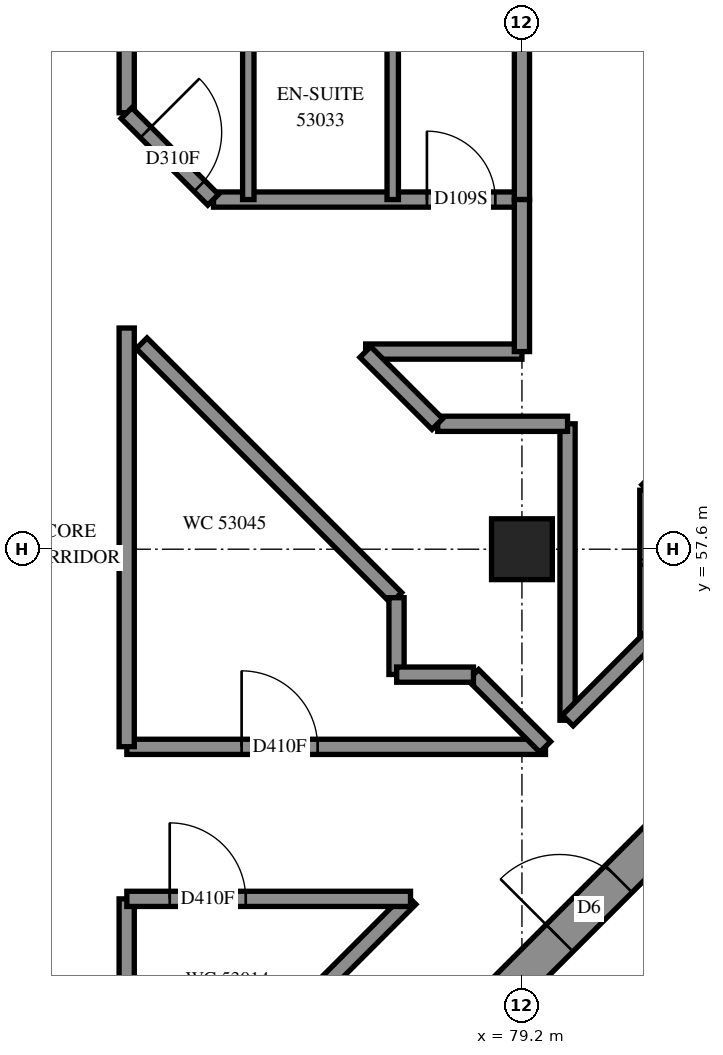
"""IFC4 building model, lengths in metres.
Left out: names, types, materials, properties, quantities, classifications, styles, units other than length and angle.
Written with IfcOpenShell. Run it as: python <this file> out.ifc"""

import sys

from ifc_helpers import new_model, si_unit, direction, frame, frame_2d, origin, origin_2d, place, context, subcontext, project, spatial, rectangle, extrude, element, fill, save


model = new_model("IFC4")
c1 = context("Model", 3, precision=1e-05, world=origin(), true_north=direction((0.0, 1.0)))
c2 = subcontext(c1, "Body", "Model", "MODEL_VIEW")
j1 = project(units=[si_unit("LENGTHUNIT", "METRE"), si_unit("PLANEANGLEUNIT", "RADIAN")], contexts=[c1])
p1 = place(None, origin())
s1 = spatial("IfcSite", under=j1, at=p1, CompositionType="ELEMENT")
p2 = place(p1, origin())
s2 = spatial("IfcBuilding", under=s1, at=p2, CompositionType="ELEMENT")
p3 = place(p2, frame((0.0, 0.0, 196.4)))
s3 = spatial("IfcBuildingStorey", under=s2, at=p3, CompositionType="ELEMENT", Elevation=196.4)
p4 = place(p3, frame((79.2, 57.6, 0.0), z_axis=(0.0, 0.0, 1.0), x_axis=(1.0, 0.0, 0.0)))
e1 = element("IfcColumn", 1, at=p4, inside=s3, PredefinedType="COLUMN", context=c2, shape_type="SweptSolid", body=[
    extrude(rectangle(XDim=0.8, YDim=0.8, at=origin_2d()), origin(), (0.0, 0.0, 1.0), 3.1),
])
p5 = place(p3, frame((76.478, 49.267, -0.3), z_axis=(0.0, 0.0, 1.0), x_axis=(0.7071067812, 0.7071067812, 0.0)))
e2 = element("IfcWall", 2, at=p5, inside=s3, PredefinedType="SHEAR", context=c2, shape_type="SweptSolid", body=[
    extrude(rectangle(XDim=14.4, YDim=0.5, at=frame_2d((7.2, 0.0))), origin(), (0.0, 0.0, 1.0), 2.7),
])
p6 = place(p5, frame((4.55, 0.0, 0.3)))
e3 = element("IfcOpeningElement", 3, at=p6, cuts=e2, PredefinedType="OPENING", context=c2, shape_type="SweptSolid", body=[
    extrude(rectangle(XDim=1.1, YDim=2.1, at=frame_2d((0.55, 1.05))), frame((0.0, 0.26, 0.0), z_axis=(0.0, -1.0, 0.0), x_axis=(1.0, 0.0, 0.0)), (0.0, 0.0, 1.0), 0.52),
])
p7 = place(p5, frame((11.35, 0.0, 0.3)))
e4 = element("IfcOpeningElement", 4, at=p7, cuts=e2, PredefinedType="OPENING", context=c2, shape_type="SweptSolid", body=[
    extrude(rectangle(XDim=1.1, YDim=2.1, at=frame_2d((0.55, 1.05))), frame((0.0, 0.26, 0.0), z_axis=(0.0, -1.0, 0.0), x_axis=(1.0, 0.0, 0.0)), (0.0, 0.0, 1.0), 0.52),
])
p8 = place(p3, frame((80.849, 58.377, 0.0), z_axis=(0.0, 0.0, 1.0), x_axis=(0.7071121294, 0.7071014329, 0.0)))
e5 = element("IfcWall", 5, at=p8, inside=s3, PredefinedType="PARTITIONING", context=c2, shape_type="SweptSolid", body=[
    extrude(rectangle(XDim=9.349, YDim=0.2, at=frame_2d((4.675, 0.0))), origin(), (0.0, 0.0, 1.0), 3.1),
])
p9 = place(p3, frame((74.002, 55.0, 0.0), z_axis=(0.0, 0.0, 1.0), x_axis=(1.0, 0.0, 0.0)))
e6 = element("IfcWall", 6, at=p9, inside=s3, PredefinedType="PARTITIONING", context=c2, shape_type="SweptSolid", body=[
    extrude(rectangle(XDim=5.508, YDim=0.2, at=frame_2d((2.754, 0.0))), origin(), (0.0, 0.0, 1.0), 3.1),
])
p10 = place(p9, frame((1.51, 0.0, 0.0)))
e7 = element("IfcOpeningElement", 7, at=p10, cuts=e6, PredefinedType="OPENING", context=c2, shape_type="SweptSolid", body=[
    extrude(rectangle(XDim=1.0, YDim=2.1, at=frame_2d((0.5, 1.05))), frame((0.0, 0.11, 0.0), z_axis=(0.0, -1.0, 0.0), x_axis=(1.0, 0.0, 0.0)), (0.0, 0.0, 1.0), 0.22),
])
p11 = place(p3, frame((74.0, 55.002, 0.0), z_axis=(0.0, 0.0, 1.0), x_axis=(0.0, 1.0, 0.0)))
e8 = element("IfcWall", 8, at=p11, inside=s3, PredefinedType="PARTITIONING", context=c2, shape_type="SweptSolid", body=[
    extrude(rectangle(XDim=5.508, YDim=0.2, at=frame_2d((2.754, 0.0))), origin(), (0.0, 0.0, 1.0), 3.1),
])
p12 = place(p3, frame((74.001, 49.267, 0.0), z_axis=(0.0, 0.0, 1.0), x_axis=(0.7071067812, 0.7071067812, 0.0)))
e9 = element("IfcWall", 9, at=p12, inside=s3, PredefinedType="PARTITIONING", context=c2, shape_type="SweptSolid", body=[
    extrude(rectangle(XDim=5.278, YDim=0.2, at=frame_2d((2.639, 0.0))), origin(), (0.0, 0.0, 1.0), 3.1),
])
p13 = place(p3, frame((74.197, 60.309, 0.0), z_axis=(0.0, 0.0, 1.0), x_axis=(0.7071067812, -0.7071067812, 0.0)))
e10 = element("IfcWall", 10, at=p13, inside=s3, PredefinedType="PARTITIONING", context=c2, shape_type="SweptSolid", body=[
    extrude(rectangle(XDim=4.738, YDim=0.2, at=frame_2d((2.369, 0.0))), origin(), (0.0, 0.0, 1.0), 3.1),
])
p14 = place(p3, frame((75.142, 62.2, 0.0), z_axis=(0.0, 0.0, 1.0), x_axis=(1.0, 0.0, 0.0)))
e11 = element("IfcWall", 11, at=p14, inside=s3, PredefinedType="PARTITIONING", context=c2, shape_type="SweptSolid", body=[
    extrude(rectangle(XDim=4.058, YDim=0.2, at=frame_2d((2.029, 0.0))), origin(), (0.0, 0.0, 1.0), 3.1),
])
p15 = place(p14, frame((2.808, 0.0, 0.0)))
e12 = element("IfcOpeningElement", 12, at=p15, cuts=e11, PredefinedType="OPENING", context=c2, shape_type="SweptSolid", body=[
    extrude(rectangle(XDim=0.9, YDim=2.1, at=frame_2d((0.45, 1.05))), frame((0.0, 0.11, 0.0), z_axis=(0.0, -1.0, 0.0), x_axis=(1.0, 0.0, 0.0)), (0.0, 0.0, 1.0), 0.22),
])
p16 = place(p3, frame((79.8, 55.35, 0.0), z_axis=(0.0, 0.0, 1.0), x_axis=(0.0, 1.0, 0.0)))
e13 = element("IfcWall", 13, at=p16, inside=s3, PredefinedType="PARTITIONING", context=c2, shape_type="SweptSolid", body=[
    extrude(rectangle(XDim=3.9, YDim=0.2, at=frame_2d((1.95, 0.0))), origin(), (0.0, 0.0, 1.0), 3.1),
])
p17 = place(p3, frame((74.0, 49.266, 0.0), z_axis=(0.0, 0.0, 1.0), x_axis=(0.0, 1.0, 0.0)))
e14 = element("IfcWall", 14, at=p17, inside=s3, PredefinedType="PARTITIONING", context=c2, shape_type="SweptSolid", body=[
    extrude(rectangle(XDim=3.734, YDim=0.2, at=frame_2d((1.867, 0.0))), origin(), (0.0, 0.0, 1.0), 3.1),
])
p18 = place(p3, frame((74.002, 53.0, 0.0), z_axis=(0.0, 0.0, 1.0), x_axis=(1.0, 0.0, 0.0)))
e15 = element("IfcWall", 15, at=p18, inside=s3, PredefinedType="PARTITIONING", context=c2, shape_type="SweptSolid", body=[
    extrude(rectangle(XDim=3.732, YDim=0.2, at=frame_2d((1.866, 0.0))), origin(), (0.0, 0.0, 1.0), 3.1),
])
p19 = place(p18, frame((0.564, 0.0, 0.0)))
e16 = element("IfcOpeningElement", 16, at=p19, cuts=e15, PredefinedType="OPENING", context=c2, shape_type="SweptSolid", body=[
    extrude(rectangle(XDim=1.0, YDim=2.1, at=frame_2d((0.5, 1.05))), frame((0.0, 0.11, 0.0), z_axis=(0.0, -1.0, 0.0), x_axis=(1.0, 0.0, 0.0)), (0.0, 0.0, 1.0), 0.22),
])
p20 = place(p3, frame((74.0, 63.342, 0.0), z_axis=(0.0, 0.0, 1.0), x_axis=(0.0, 1.0, 0.0)))
e17 = element("IfcWall", 17, at=p20, inside=s3, PredefinedType="PARTITIONING", context=c2, shape_type="SweptSolid", body=[
    extrude(rectangle(XDim=3.458, YDim=0.2, at=frame_2d((1.729, 0.0))), origin(), (0.0, 0.0, 1.0), 3.1),
])
for number, where, z_axis, x_axis in (
    (18, (75.6, 62.2, 0.0), (0.0, 0.0, 1.0), (0.0, 1.0, 0.0)),
    (19, (77.5, 62.2, 0.0), (0.0, 0.0, 1.0), (0.0, 1.0, 0.0)),
):
    element("IfcWall", number, at=place(p3, frame(where, z_axis=z_axis, x_axis=x_axis)), inside=s3, PredefinedType="PARTITIONING", context=c2, shape_type="SweptSolid", body=[
        extrude(rectangle(XDim=2.4, YDim=0.15, at=frame_2d((1.2, 0.0))), origin(), (0.0, 0.0, 1.0), 3.1),
    ])
p21 = place(p3, frame((79.2, 62.2, 0.0), z_axis=(0.0, 0.0, 1.0), x_axis=(0.0, 1.0, 0.0)))
e20 = element("IfcWall", 20, at=p21, inside=s3, PredefinedType="PARTITIONING", context=c2, shape_type="SweptSolid", body=[
    extrude(rectangle(XDim=2.2, YDim=0.2, at=frame_2d((1.1, 0.0))), origin(), (0.0, 0.0, 1.0), 3.1),
])
p22 = place(p3, frame((77.144, 60.2, 0.0), z_axis=(0.0, 0.0, 1.0), x_axis=(1.0, 0.0, 0.0)))
e21 = element("IfcWall", 21, at=p22, inside=s3, PredefinedType="PARTITIONING", context=c2, shape_type="SweptSolid", body=[
    extrude(rectangle(XDim=2.056, YDim=0.2, at=frame_2d((1.028, 0.0))), origin(), (0.0, 0.0, 1.0), 3.1),
])
p23 = place(p3, frame((79.2, 60.2, 0.0), z_axis=(0.0, 0.0, 1.0), x_axis=(0.0, 1.0, 0.0)))
e22 = element("IfcWall", 22, at=p23, inside=s3, PredefinedType="PARTITIONING", context=c2, shape_type="SweptSolid", body=[
    extrude(rectangle(XDim=2.0, YDim=0.2, at=frame_2d((1.0, 0.0))), origin(), (0.0, 0.0, 1.0), 3.1),
])
p24 = place(p3, frame((80.85, 56.49, 0.0), z_axis=(0.0, 0.0, 1.0), x_axis=(0.0, 1.0, 0.0)))
e23 = element("IfcWall", 23, at=p24, inside=s3, PredefinedType="PARTITIONING", context=c2, shape_type="SweptSolid", body=[
    extrude(rectangle(XDim=1.886, YDim=0.2, at=frame_2d((0.943, 0.0))), origin(), (0.0, 0.0, 1.0), 3.1),
])
p25 = place(p3, frame((78.092, 59.25, 0.0), z_axis=(0.0, 0.0, 1.0), x_axis=(1.0, 0.0, 0.0)))
e24 = element("IfcWall", 24, at=p25, inside=s3, PredefinedType="PARTITIONING", context=c2, shape_type="SweptSolid", body=[
    extrude(rectangle(XDim=1.708, YDim=0.2, at=frame_2d((0.854, 0.0))), origin(), (0.0, 0.0, 1.0), 3.1),
])
p26 = place(p3, frame((73.997, 63.337, 0.0), z_axis=(0.0, 0.0, 1.0), x_axis=(0.7071067812, -0.7071067812, 0.0)))
e25 = element("IfcWall", 25, at=p26, inside=s3, PredefinedType="PARTITIONING", context=c2, shape_type="SweptSolid", body=[
    extrude(rectangle(XDim=1.612, YDim=0.2, at=frame_2d((0.806, 0.0))), origin(), (0.0, 0.0, 1.0), 3.1),
])
p27 = place(p26, frame((0.357, 0.0, 0.0)))
e26 = element("IfcOpeningElement", 26, at=p27, cuts=e25, PredefinedType="OPENING", context=c2, shape_type="SweptSolid", body=[
    extrude(rectangle(XDim=1.0, YDim=2.1, at=frame_2d((0.5, 1.05))), frame((0.0, 0.11, 0.0), z_axis=(0.0, -1.0, 0.0), x_axis=(1.0, 0.0, 0.0)), (0.0, 0.0, 1.0), 0.22),
])
p28 = place(p3, frame((79.803, 55.347, 0.0), z_axis=(0.0, 0.0, 1.0), x_axis=(0.706460727, 0.7077522457, 0.0)))
e27 = element("IfcWall", 27, at=p28, inside=s3, PredefinedType="PARTITIONING", context=c2, shape_type="SweptSolid", body=[
    extrude(rectangle(XDim=1.549, YDim=0.2, at=frame_2d((0.774, 0.0))), origin(), (0.0, 0.0, 1.0), 3.1),
])
for number, where, z_axis, x_axis in (
    (28, (78.559, 55.947, 0.0), (0.0, 0.0, 1.0), (0.707, -0.707, 0.0)),
    (29, (77.139, 60.195, 0.0), (0.0, 0.0, 1.0), (0.707, -0.707, 0.0)),
):
    element("IfcWall", number, at=place(p3, frame(where, z_axis=z_axis, x_axis=x_axis)), inside=s3, PredefinedType="PARTITIONING", context=c2, shape_type="SweptSolid", body=[
        extrude(rectangle(XDim=1.341, YDim=0.2, at=frame_2d((0.67, 0.0))), origin(), (0.0, 0.0, 1.0), 3.1),
    ])
for number, where, z_axis, x_axis in (
    (30, (77.55, 55.952, 0.0), (0.0, 0.0, 1.0), (0.0, 1.0, 0.0)),
    (31, (77.552, 55.95, 0.0), (0.0, 0.0, 1.0), (1.0, 0.0, 0.0)),
):
    element("IfcWall", number, at=place(p3, frame(where, z_axis=z_axis, x_axis=x_axis)), inside=s3, PredefinedType="PARTITIONING", context=c2, shape_type="SweptSolid", body=[
        extrude(rectangle(XDim=1.01, YDim=0.2, at=frame_2d((0.505, 0.0))), origin(), (0.0, 0.0, 1.0), 3.1),
    ])
p29 = place(p6, origin())
e32 = element("IfcDoor", 32, at=p29, inside=s3, OperationType="DOUBLE_DOOR_SINGLE_SWING", PredefinedType="DOOR", context=c2, shape_type="SweptSolid", body=[
    extrude(rectangle(XDim=1.1, YDim=2.1, at=frame_2d((0.55, 1.05))), frame((0.0, 0.025, 0.0), z_axis=(0.0, -1.0, 0.0), x_axis=(1.0, 0.0, 0.0)), (0.0, 0.0, 1.0), 0.05),
])
fill(e3, e32)
p30 = place(p19, origin())
e33 = element("IfcDoor", 33, at=p30, inside=s3, OperationType="SINGLE_SWING_RIGHT", PredefinedType="DOOR", context=c2, shape_type="SweptSolid", body=[
    extrude(rectangle(XDim=1.0, YDim=2.1, at=frame_2d((0.5, 1.05))), frame((0.0, 0.025, 0.0), z_axis=(0.0, -1.0, 0.0), x_axis=(1.0, 0.0, 0.0)), (0.0, 0.0, 1.0), 0.05),
])
fill(e16, e33)
p31 = place(p27, origin())
e34 = element("IfcDoor", 34, at=p31, inside=s3, OperationType="SINGLE_SWING_RIGHT", PredefinedType="DOOR", context=c2, shape_type="SweptSolid", body=[
    extrude(rectangle(XDim=1.0, YDim=2.1, at=frame_2d((0.5, 1.05))), frame((0.0, 0.025, 0.0), z_axis=(0.0, -1.0, 0.0), x_axis=(1.0, 0.0, 0.0)), (0.0, 0.0, 1.0), 0.05),
])
fill(e26, e34)
p32 = place(p15, origin())
e35 = element("IfcDoor", 35, at=p32, inside=s3, OperationType="SINGLE_SWING_LEFT", PredefinedType="DOOR", context=c2, shape_type="SweptSolid", body=[
    extrude(rectangle(XDim=0.9, YDim=2.1, at=frame_2d((0.45, 1.05))), frame((0.0, 0.025, 0.0), z_axis=(0.0, -1.0, 0.0), x_axis=(1.0, 0.0, 0.0)), (0.0, 0.0, 1.0), 0.05),
])
fill(e12, e35)
p33 = place(p10, origin())
e36 = element("IfcDoor", 36, at=p33, inside=s3, OperationType="SINGLE_SWING_LEFT", PredefinedType="DOOR", context=c2, shape_type="SweptSolid", body=[
    extrude(rectangle(XDim=1.0, YDim=2.1, at=frame_2d((0.5, 1.05))), frame((0.0, 0.025, 0.0), z_axis=(0.0, -1.0, 0.0), x_axis=(1.0, 0.0, 0.0)), (0.0, 0.0, 1.0), 0.05),
])
fill(e7, e36)
save(model, sys.argv[1])
